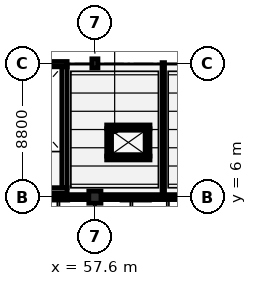
"""IFC4 building model, lengths in metres.
Left out: names, types, materials, properties, quantities, classifications, styles, units other than length and angle.
Written with IfcOpenShell. Run it as: python <this file> out.ifc"""

import sys

from ifc_helpers import new_model, si_unit, direction, frame, frame_2d, origin, origin_2d, place, context, subcontext, project, spatial, polyline, rectangle, outline, extrude, element, fill, save


model = new_model("IFC4")
c1 = context("Model", 3, precision=1e-05, world=origin(), true_north=direction((0.0, 1.0)))
c2 = subcontext(c1, "Body", "Model", "MODEL_VIEW")
j1 = project(units=[si_unit("LENGTHUNIT", "METRE"), si_unit("PLANEANGLEUNIT", "RADIAN")], contexts=[c1])
p1 = place(None, origin())
s1 = spatial("IfcSite", under=j1, at=p1, CompositionType="ELEMENT")
p2 = place(p1, origin())
s2 = spatial("IfcBuilding", under=s1, at=p2, CompositionType="ELEMENT")
p3 = place(p2, frame((0.0, 0.0, 9.6)))
s3 = spatial("IfcBuildingStorey", under=s2, at=p3, CompositionType="ELEMENT", Elevation=9.6)
p4 = place(p3, frame((57.6, 6.0, 0.0), z_axis=(0.0, 0.0, 1.0), x_axis=(1.0, 0.0, 0.0)))
e1 = element("IfcColumn", 1, at=p4, inside=s3, PredefinedType="COLUMN", context=c2, shape_type="SweptSolid", body=[
    extrude(rectangle(XDim=0.8, YDim=0.8, at=origin_2d()), origin(), (0.0, 0.0, 1.0), 4.5),
])
p5 = place(p3, frame((57.6, 14.8, 0.0), z_axis=(0.0, 0.0, 1.0), x_axis=(1.0, 0.0, 0.0)))
e2 = element("IfcColumn", 2, at=p5, inside=s3, PredefinedType="COLUMN", context=c2, shape_type="SweptSolid", body=[
    extrude(rectangle(XDim=0.4, YDim=0.6, at=origin_2d()), origin(), (0.0, 0.0, 1.0), 4.5),
])
p6 = place(p3, frame((48.4, 6.0, 0.0), z_axis=(0.0, 0.0, 1.0), x_axis=(1.0, 0.0, 0.0)))
e3 = element("IfcWall", 3, at=p6, inside=s3, PredefinedType="STANDARD", context=c2, shape_type="SweptSolid", body=[
    extrude(rectangle(XDim=8.8, YDim=0.3, at=frame_2d((4.4, 0.0))), origin(), (0.0, 0.0, 1.0), 1.85),
])
p7 = place(p3, frame((48.4, 6.0, 2.38), z_axis=(0.0, 0.0, 1.0), x_axis=(1.0, 0.0, 0.0)))
e4 = element("IfcWall", 4, at=p7, inside=s3, PredefinedType="STANDARD", context=c2, shape_type="SweptSolid", body=[
    extrude(outline(polyline([(0.0, 0.0), (8.8, 0.0), (8.8, 3.267), (0.0, 2.75), (0.0, 0.0)])), frame((0.0, 0.15, 0.0), z_axis=(0.0, -1.0, 0.0), x_axis=(1.0, 0.0, 0.0)), (0.0, 0.0, 1.0), 0.3),
])
p8 = place(p7, frame((0.85, 0.0, 0.25)))
e5 = element("IfcOpeningElement", 5, at=p8, cuts=e4, PredefinedType="OPENING", context=c2, shape_type="SweptSolid", body=[
    extrude(rectangle(XDim=0.67, YDim=2.29, at=frame_2d((0.335, 1.145))), frame((0.0, 0.16, 0.0), z_axis=(0.0, -1.0, 0.0), x_axis=(1.0, 0.0, 0.0)), (0.0, 0.0, 1.0), 0.32),
])
p9 = place(p7, frame((2.9, 0.0, 0.25)))
e6 = element("IfcOpeningElement", 6, at=p9, cuts=e4, PredefinedType="OPENING", context=c2, shape_type="SweptSolid", body=[
    extrude(rectangle(XDim=0.63, YDim=2.26, at=frame_2d((0.315, 1.13))), frame((0.0, 0.16, 0.0), z_axis=(0.0, -1.0, 0.0), x_axis=(1.0, 0.0, 0.0)), (0.0, 0.0, 1.0), 0.32),
])
p10 = place(p7, frame((4.95, 0.0, 0.25)))
e7 = element("IfcOpeningElement", 7, at=p10, cuts=e4, PredefinedType="OPENING", context=c2, shape_type="SweptSolid", body=[
    extrude(rectangle(XDim=0.75, YDim=2.35, at=frame_2d((0.375, 1.175))), frame((0.0, 0.16, 0.0), z_axis=(0.0, -1.0, 0.0), x_axis=(1.0, 0.0, 0.0)), (0.0, 0.0, 1.0), 0.32),
])
p11 = place(p7, frame((7.0, 0.0, 0.25)))
e8 = element("IfcOpeningElement", 8, at=p11, cuts=e4, PredefinedType="OPENING", context=c2, shape_type="SweptSolid", body=[
    extrude(rectangle(XDim=0.71, YDim=2.32, at=frame_2d((0.355, 1.16))), frame((0.0, 0.16, 0.0), z_axis=(0.0, -1.0, 0.0), x_axis=(1.0, 0.0, 0.0)), (0.0, 0.0, 1.0), 0.32),
])
p12 = place(p3, frame((58.0, 6.0, 0.0), z_axis=(0.0, 0.0, 1.0), x_axis=(1.0, 0.0, 0.0)))
e9 = element("IfcWall", 9, at=p12, inside=s3, PredefinedType="STANDARD", context=c2, shape_type="SweptSolid", body=[
    extrude(rectangle(XDim=8.8, YDim=0.3, at=frame_2d((4.4, 0.0))), origin(), (0.0, 0.0, 1.0), 1.85),
])
p13 = place(p3, frame((58.0, 6.0, 2.38), z_axis=(0.0, 0.0, 1.0), x_axis=(1.0, 0.0, 0.0)))
e10 = element("IfcWall", 10, at=p13, inside=s3, PredefinedType="STANDARD", context=c2, shape_type="SweptSolid", body=[
    extrude(outline(polyline([(0.0, 0.0), (8.8, 0.0), (8.8, 3.705), (0.0, 3.267), (0.0, 0.0)])), frame((0.0, 0.15, 0.0), z_axis=(0.0, -1.0, 0.0), x_axis=(1.0, 0.0, 0.0)), (0.0, 0.0, 1.0), 0.3),
])
p14 = place(p13, frame((0.85, 0.0, 0.25)))
e11 = element("IfcOpeningElement", 11, at=p14, cuts=e10, PredefinedType="OPENING", context=c2, shape_type="SweptSolid", body=[
    extrude(rectangle(XDim=0.67, YDim=2.29, at=frame_2d((0.335, 1.145))), frame((0.0, 0.16, 0.0), z_axis=(0.0, -1.0, 0.0), x_axis=(1.0, 0.0, 0.0)), (0.0, 0.0, 1.0), 0.32),
])
p15 = place(p13, frame((2.9, 0.0, 0.25)))
e12 = element("IfcOpeningElement", 12, at=p15, cuts=e10, PredefinedType="OPENING", context=c2, shape_type="SweptSolid", body=[
    extrude(rectangle(XDim=0.63, YDim=2.26, at=frame_2d((0.315, 1.13))), frame((0.0, 0.16, 0.0), z_axis=(0.0, -1.0, 0.0), x_axis=(1.0, 0.0, 0.0)), (0.0, 0.0, 1.0), 0.32),
])
p16 = place(p13, frame((4.95, 0.0, 0.25)))
e13 = element("IfcOpeningElement", 13, at=p16, cuts=e10, PredefinedType="OPENING", context=c2, shape_type="SweptSolid", body=[
    extrude(rectangle(XDim=0.75, YDim=2.35, at=frame_2d((0.375, 1.175))), frame((0.0, 0.16, 0.0), z_axis=(0.0, -1.0, 0.0), x_axis=(1.0, 0.0, 0.0)), (0.0, 0.0, 1.0), 0.32),
])
p17 = place(p13, frame((7.0, 0.0, 0.25)))
e14 = element("IfcOpeningElement", 14, at=p17, cuts=e10, PredefinedType="OPENING", context=c2, shape_type="SweptSolid", body=[
    extrude(rectangle(XDim=0.71, YDim=2.32, at=frame_2d((0.355, 1.16))), frame((0.0, 0.16, 0.0), z_axis=(0.0, -1.0, 0.0), x_axis=(1.0, 0.0, 0.0)), (0.0, 0.0, 1.0), 0.32),
])
for number, where, z_axis, x_axis in (
    (15, (55.775, 6.45, 0.0), (0.0, 0.0, 1.0), (-1.0, 0.0, 0.0)),
    (16, (50.125, 14.75, 0.0), (0.0, 0.0, 1.0), (1.0, 0.0, 0.0)),
):
    element("IfcWall", number, at=place(p3, frame(where, z_axis=z_axis, x_axis=x_axis)), inside=s3, PredefinedType="SHEAR", context=c2, shape_type="SweptSolid", body=[
        extrude(rectangle(XDim=5.65, YDim=0.35, at=frame_2d((2.825, 0.0))), origin(), (0.0, 0.0, 1.0), 3.85),
    ])
p18 = place(p3, frame((55.6, 14.575, 0.0), z_axis=(0.0, 0.0, 1.0), x_axis=(0.0, -1.0, 0.0)))
e17 = element("IfcWall", 17, at=p18, inside=s3, PredefinedType="SHEAR", context=c2, shape_type="SweptSolid", body=[
    extrude(rectangle(XDim=7.95, YDim=0.35, at=frame_2d((3.975, 0.0))), origin(), (0.0, 0.0, 1.0), 3.85),
])
p19 = place(p18, frame((5.68, 0.0, 0.0)))
e18 = element("IfcOpeningElement", 18, at=p19, cuts=e17, PredefinedType="OPENING", context=c2, shape_type="SweptSolid", body=[
    extrude(rectangle(XDim=2.05, YDim=2.15, at=frame_2d((1.025, 1.075))), frame((0.0, 0.185, 0.0), z_axis=(0.0, -1.0, 0.0), x_axis=(1.0, 0.0, 0.0)), (0.0, 0.0, 1.0), 0.37),
])
p20 = place(p3, frame((61.225, 8.575, 0.0), z_axis=(0.0, 0.0, 1.0), x_axis=(-1.0, 0.0, 0.0)))
e19 = element("IfcWall", 19, at=p20, inside=s3, PredefinedType="SOLIDWALL", context=c2, shape_type="SweptSolid", body=[
    extrude(rectangle(XDim=2.85, YDim=0.25, at=frame_2d((1.425, 0.0))), origin(), (0.0, 0.0, 1.0), 3.55),
])
p21 = place(p3, frame((58.375, 10.625, 0.0), z_axis=(0.0, 0.0, 1.0), x_axis=(1.0, 0.0, 0.0)))
e20 = element("IfcWall", 20, at=p21, inside=s3, PredefinedType="SOLIDWALL", context=c2, shape_type="SweptSolid", body=[
    extrude(rectangle(XDim=2.85, YDim=0.25, at=frame_2d((1.425, 0.0))), origin(), (0.0, 0.0, 1.0), 3.55),
])
p22 = place(p21, frame((0.875, 0.0, 0.0)))
e21 = element("IfcOpeningElement", 21, at=p22, cuts=e20, PredefinedType="OPENING", context=c2, shape_type="SweptSolid", body=[
    extrude(rectangle(XDim=1.1, YDim=2.15, at=frame_2d((0.55, 1.075))), frame((0.0, 0.135, 0.0), z_axis=(0.0, -1.0, 0.0), x_axis=(1.0, 0.0, 0.0)), (0.0, 0.0, 1.0), 0.27),
])
for number, where, z_axis, x_axis in (
    (22, (58.5, 8.7, 0.0), (0.0, 0.0, 1.0), (0.0, 1.0, 0.0)),
    (23, (61.1, 10.5, 0.0), (0.0, 0.0, 1.0), (0.0, -1.0, 0.0)),
):
    element("IfcWall", number, at=place(p3, frame(where, z_axis=z_axis, x_axis=x_axis)), inside=s3, PredefinedType="SOLIDWALL", context=c2, shape_type="SweptSolid", body=[
        extrude(rectangle(XDim=1.8, YDim=0.25, at=frame_2d((0.9, 0.0))), origin(), (0.0, 0.0, 1.0), 3.55),
    ])
p23 = place(p3, frame((62.1, 6.05, 0.0), z_axis=(0.0, 0.0, 1.0), x_axis=(0.0, 1.0, 0.0)))
e24 = element("IfcWall", 24, at=p23, inside=s3, PredefinedType="PARTITIONING", context=c2, shape_type="SweptSolid", body=[
    extrude(rectangle(XDim=8.8, YDim=0.16, at=frame_2d((4.4, 0.0))), origin(), (0.0, 0.0, 1.0), 2.6),
])
p24 = place(p23, frame((3.5, 0.0, 0.0)))
e25 = element("IfcOpeningElement", 25, at=p24, cuts=e24, PredefinedType="OPENING", context=c2, shape_type="SweptSolid", body=[
    extrude(rectangle(XDim=1.8, YDim=2.15, at=frame_2d((0.9, 1.075))), frame((0.0, 0.09, 0.0), z_axis=(0.0, -1.0, 0.0), x_axis=(1.0, 0.0, 0.0)), (0.0, 0.0, 1.0), 0.18),
])
p25 = place(p11, origin())
e26 = element("IfcWindow", 26, at=p25, inside=s3, PartitioningType="SINGLE_PANEL", PredefinedType="WINDOW", context=c2, shape_type="SweptSolid", body=[
    extrude(rectangle(XDim=0.71, YDim=2.32, at=frame_2d((0.355, 1.16))), frame((0.0, 0.03, 0.0), z_axis=(0.0, -1.0, 0.0), x_axis=(1.0, 0.0, 0.0)), (0.0, 0.0, 1.0), 0.06),
])
fill(e8, e26)
p26 = place(p14, origin())
e27 = element("IfcWindow", 27, at=p26, inside=s3, PartitioningType="SINGLE_PANEL", PredefinedType="WINDOW", context=c2, shape_type="SweptSolid", body=[
    extrude(rectangle(XDim=0.67, YDim=2.29, at=frame_2d((0.335, 1.145))), frame((0.0, 0.03, 0.0), z_axis=(0.0, -1.0, 0.0), x_axis=(1.0, 0.0, 0.0)), (0.0, 0.0, 1.0), 0.06),
])
fill(e11, e27)
p27 = place(p15, origin())
e28 = element("IfcWindow", 28, at=p27, inside=s3, PartitioningType="SINGLE_PANEL", PredefinedType="WINDOW", context=c2, shape_type="SweptSolid", body=[
    extrude(rectangle(XDim=0.63, YDim=2.26, at=frame_2d((0.315, 1.13))), frame((0.0, 0.03, 0.0), z_axis=(0.0, -1.0, 0.0), x_axis=(1.0, 0.0, 0.0)), (0.0, 0.0, 1.0), 0.06),
])
fill(e12, e28)
p28 = place(p16, origin())
e29 = element("IfcWindow", 29, at=p28, inside=s3, PartitioningType="SINGLE_PANEL", PredefinedType="WINDOW", context=c2, shape_type="SweptSolid", body=[
    extrude(rectangle(XDim=0.75, YDim=2.35, at=frame_2d((0.375, 1.175))), frame((0.0, 0.03, 0.0), z_axis=(0.0, -1.0, 0.0), x_axis=(1.0, 0.0, 0.0)), (0.0, 0.0, 1.0), 0.06),
])
fill(e13, e29)
p29 = place(p19, origin())
e30 = element("IfcDoor", 30, at=p29, inside=s3, OperationType="DOUBLE_DOOR_SINGLE_SWING", PredefinedType="DOOR", context=c2, shape_type="SweptSolid", body=[
    extrude(rectangle(XDim=2.05, YDim=2.15, at=frame_2d((1.025, 1.075))), frame((0.0, 0.025, 0.0), z_axis=(0.0, -1.0, 0.0), x_axis=(1.0, 0.0, 0.0)), (0.0, 0.0, 1.0), 0.05),
])
fill(e18, e30)
p30 = place(p22, origin())
e31 = element("IfcDoor", 31, at=p30, inside=s3, OperationType="DOUBLE_DOOR_SLIDING", PredefinedType="DOOR", context=c2, shape_type="SweptSolid", body=[
    extrude(rectangle(XDim=1.1, YDim=2.15, at=frame_2d((0.55, 1.075))), frame((0.0, 0.025, 0.0), z_axis=(0.0, -1.0, 0.0), x_axis=(1.0, 0.0, 0.0)), (0.0, 0.0, 1.0), 0.05),
])
fill(e21, e31)
p31 = place(p24, origin())
e32 = element("IfcDoor", 32, at=p31, inside=s3, OperationType="DOUBLE_DOOR_SINGLE_SWING", PredefinedType="DOOR", context=c2, shape_type="SweptSolid", body=[
    extrude(rectangle(XDim=1.8, YDim=2.15, at=frame_2d((0.9, 1.075))), frame((0.0, 0.025, 0.0), z_axis=(0.0, -1.0, 0.0), x_axis=(1.0, 0.0, 0.0)), (0.0, 0.0, 1.0), 0.05),
])
fill(e25, e32)
save(model, sys.argv[1])
